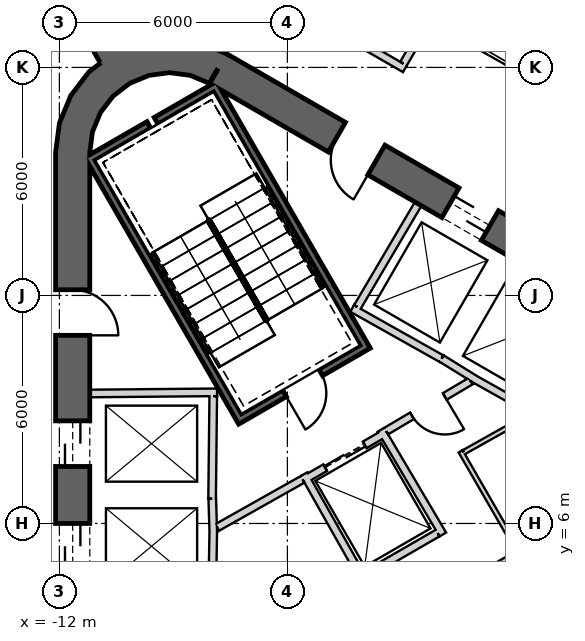
"""IFC4 building model, lengths in metres.
Left out: names, types, materials, properties, quantities, classifications, styles, units other than length and angle.
Written with IfcOpenShell. Run it as: python <this file> out.ifc"""

import sys

from ifc_helpers import new_model, si_unit, direction, frame, frame_2d, origin, place, context, subcontext, project, spatial, polyline, rectangle, outline, extrude, element, fill, save


model = new_model("IFC4")
c1 = context("Model", 3, precision=1e-05, world=origin(), true_north=direction((0.0, 1.0)))
c2 = subcontext(c1, "Body", "Model", "MODEL_VIEW")
j1 = project(units=[si_unit("LENGTHUNIT", "METRE"), si_unit("PLANEANGLEUNIT", "RADIAN")], contexts=[c1])
p1 = place(None, origin())
s1 = spatial("IfcSite", under=j1, at=p1, CompositionType="ELEMENT")
p2 = place(p1, origin())
s2 = spatial("IfcBuilding", under=s1, at=p2, CompositionType="ELEMENT")
p3 = place(p2, frame((0.0, 0.0, 21.5)))
s3 = spatial("IfcBuildingStorey", under=s2, at=p3, CompositionType="ELEMENT", Elevation=21.5)
p4 = place(p3, frame((19.475, 2.208, 0.0), z_axis=(0.0, 0.0, 1.0), x_axis=(-0.866028369851, 0.499994862586, 0.0)))
e1 = element("IfcWall", 1, at=p4, inside=s3, PredefinedType="SHEAR", context=c2, shape_type="SweptSolid", body=[
    extrude(rectangle(XDim=31.523, YDim=0.9, at=frame_2d((15.762, 0.0))), origin(), (0.0, 0.0, 1.0), 6.0),
])
p5 = place(p4, frame((7.062, 0.0, 0.0)))
e2 = element("IfcOpeningElement", 2, at=p5, cuts=e1, PredefinedType="OPENING", context=c2, shape_type="SweptSolid", body=[
    extrude(rectangle(XDim=1.2, YDim=2.4, at=frame_2d((0.6, 1.2))), frame((0.0, 0.46, 0.0), z_axis=(0.0, -1.0, 0.0), x_axis=(1.0, 0.0, 0.0)), (0.0, 0.0, 1.0), 0.92),
])
p6 = place(p4, frame((9.762, 0.0, 0.0)))
e3 = element("IfcOpeningElement", 3, at=p6, cuts=e1, PredefinedType="OPENING", context=c2, shape_type="SweptSolid", body=[
    extrude(rectangle(XDim=1.2, YDim=2.4, at=frame_2d((0.6, 1.2))), frame((0.0, 0.46, 0.0), z_axis=(0.0, -1.0, 0.0), x_axis=(1.0, 0.0, 0.0)), (0.0, 0.0, 1.0), 0.92),
])
p7 = place(p4, frame((12.462, 0.0, 0.0)))
e4 = element("IfcOpeningElement", 4, at=p7, cuts=e1, PredefinedType="OPENING", context=c2, shape_type="SweptSolid", body=[
    extrude(rectangle(XDim=1.2, YDim=2.4, at=frame_2d((0.6, 1.2))), frame((0.0, 0.46, 0.0), z_axis=(0.0, -1.0, 0.0), x_axis=(1.0, 0.0, 0.0)), (0.0, 0.0, 1.0), 0.92),
])
p8 = place(p4, frame((15.162, 0.0, 0.0)))
e5 = element("IfcOpeningElement", 5, at=p8, cuts=e1, PredefinedType="OPENING", context=c2, shape_type="SweptSolid", body=[
    extrude(rectangle(XDim=1.2, YDim=2.4, at=frame_2d((0.6, 1.2))), frame((0.0, 0.46, 0.0), z_axis=(0.0, -1.0, 0.0), x_axis=(1.0, 0.0, 0.0)), (0.0, 0.0, 1.0), 0.92),
])
p9 = place(p4, frame((17.862, 0.0, 0.0)))
e6 = element("IfcOpeningElement", 6, at=p9, cuts=e1, PredefinedType="OPENING", context=c2, shape_type="SweptSolid", body=[
    extrude(rectangle(XDim=1.2, YDim=2.4, at=frame_2d((0.6, 1.2))), frame((0.0, 0.46, 0.0), z_axis=(0.0, -1.0, 0.0), x_axis=(1.0, 0.0, 0.0)), (0.0, 0.0, 1.0), 0.92),
])
p10 = place(p4, frame((20.562, 0.0, 0.0)))
e7 = element("IfcOpeningElement", 7, at=p10, cuts=e1, PredefinedType="OPENING", context=c2, shape_type="SweptSolid", body=[
    extrude(rectangle(XDim=1.2, YDim=2.4, at=frame_2d((0.6, 1.2))), frame((0.0, 0.46, 0.0), z_axis=(0.0, -1.0, 0.0), x_axis=(1.0, 0.0, 0.0)), (0.0, 0.0, 1.0), 0.92),
])
p11 = place(p4, frame((23.262, 0.0, 0.0)))
e8 = element("IfcOpeningElement", 8, at=p11, cuts=e1, PredefinedType="OPENING", context=c2, shape_type="SweptSolid", body=[
    extrude(rectangle(XDim=1.2, YDim=2.4, at=frame_2d((0.6, 1.2))), frame((0.0, 0.46, 0.0), z_axis=(0.0, -1.0, 0.0), x_axis=(1.0, 0.0, 0.0)), (0.0, 0.0, 1.0), 0.92),
])
p12 = place(p4, frame((3.612, 0.0, 0.0)))
e9 = element("IfcOpeningElement", 9, at=p12, cuts=e1, PredefinedType="OPENING", context=c2, shape_type="SweptSolid", body=[
    extrude(rectangle(XDim=1.2, YDim=2.4, at=frame_2d((0.6, 1.2))), frame((0.0, 0.46, 0.0), z_axis=(0.0, -1.0, 0.0), x_axis=(1.0, 0.0, 0.0)), (0.0, 0.0, 1.0), 0.92),
])
p13 = place(p4, frame((26.712, 0.0, 0.0)))
e10 = element("IfcOpeningElement", 10, at=p13, cuts=e1, PredefinedType="OPENING", context=c2, shape_type="SweptSolid", body=[
    extrude(rectangle(XDim=1.2, YDim=2.4, at=frame_2d((0.6, 1.2))), frame((0.0, 0.46, 0.0), z_axis=(0.0, -1.0, 0.0), x_axis=(1.0, 0.0, 0.0)), (0.0, 0.0, 1.0), 0.92),
])
p14 = place(p3, frame((-11.65, 15.762, 0.0), z_axis=(0.0, 0.0, 1.0), x_axis=(0.0, -1.0, 0.0)))
e11 = element("IfcWall", 11, at=p14, inside=s3, PredefinedType="SHEAR", context=c2, shape_type="SweptSolid", body=[
    extrude(rectangle(XDim=31.523, YDim=0.9, at=frame_2d((15.762, 0.0))), origin(), (0.0, 0.0, 1.0), 6.0),
])
p15 = place(p14, frame((7.062, 0.0, 0.0)))
e12 = element("IfcOpeningElement", 12, at=p15, cuts=e11, PredefinedType="OPENING", context=c2, shape_type="SweptSolid", body=[
    extrude(rectangle(XDim=1.2, YDim=2.4, at=frame_2d((0.6, 1.2))), frame((0.0, 0.46, 0.0), z_axis=(0.0, -1.0, 0.0), x_axis=(1.0, 0.0, 0.0)), (0.0, 0.0, 1.0), 0.92),
])
p16 = place(p14, frame((9.762, 0.0, 0.0)))
e13 = element("IfcOpeningElement", 13, at=p16, cuts=e11, PredefinedType="OPENING", context=c2, shape_type="SweptSolid", body=[
    extrude(rectangle(XDim=1.2, YDim=2.4, at=frame_2d((0.6, 1.2))), frame((0.0, 0.46, 0.0), z_axis=(0.0, -1.0, 0.0), x_axis=(1.0, 0.0, 0.0)), (0.0, 0.0, 1.0), 0.92),
])
p17 = place(p14, frame((12.462, 0.0, 0.0)))
e14 = element("IfcOpeningElement", 14, at=p17, cuts=e11, PredefinedType="OPENING", context=c2, shape_type="SweptSolid", body=[
    extrude(rectangle(XDim=1.2, YDim=2.4, at=frame_2d((0.6, 1.2))), frame((0.0, 0.46, 0.0), z_axis=(0.0, -1.0, 0.0), x_axis=(1.0, 0.0, 0.0)), (0.0, 0.0, 1.0), 0.92),
])
p18 = place(p14, frame((15.162, 0.0, 0.0)))
e15 = element("IfcOpeningElement", 15, at=p18, cuts=e11, PredefinedType="OPENING", context=c2, shape_type="SweptSolid", body=[
    extrude(rectangle(XDim=1.2, YDim=2.4, at=frame_2d((0.6, 1.2))), frame((0.0, 0.46, 0.0), z_axis=(0.0, -1.0, 0.0), x_axis=(1.0, 0.0, 0.0)), (0.0, 0.0, 1.0), 0.92),
])
p19 = place(p14, frame((17.862, 0.0, 0.0)))
e16 = element("IfcOpeningElement", 16, at=p19, cuts=e11, PredefinedType="OPENING", context=c2, shape_type="SweptSolid", body=[
    extrude(rectangle(XDim=1.2, YDim=2.4, at=frame_2d((0.6, 1.2))), frame((0.0, 0.46, 0.0), z_axis=(0.0, -1.0, 0.0), x_axis=(1.0, 0.0, 0.0)), (0.0, 0.0, 1.0), 0.92),
])
p20 = place(p14, frame((20.562, 0.0, 0.0)))
e17 = element("IfcOpeningElement", 17, at=p20, cuts=e11, PredefinedType="OPENING", context=c2, shape_type="SweptSolid", body=[
    extrude(rectangle(XDim=1.2, YDim=2.4, at=frame_2d((0.6, 1.2))), frame((0.0, 0.46, 0.0), z_axis=(0.0, -1.0, 0.0), x_axis=(1.0, 0.0, 0.0)), (0.0, 0.0, 1.0), 0.92),
])
p21 = place(p14, frame((23.262, 0.0, 0.0)))
e18 = element("IfcOpeningElement", 18, at=p21, cuts=e11, PredefinedType="OPENING", context=c2, shape_type="SweptSolid", body=[
    extrude(rectangle(XDim=1.2, YDim=2.4, at=frame_2d((0.6, 1.2))), frame((0.0, 0.46, 0.0), z_axis=(0.0, -1.0, 0.0), x_axis=(1.0, 0.0, 0.0)), (0.0, 0.0, 1.0), 0.92),
])
p22 = place(p14, frame((3.612, 0.0, 0.0)))
e19 = element("IfcOpeningElement", 19, at=p22, cuts=e11, PredefinedType="OPENING", context=c2, shape_type="SweptSolid", body=[
    extrude(rectangle(XDim=1.2, YDim=2.4, at=frame_2d((0.6, 1.2))), frame((0.0, 0.46, 0.0), z_axis=(0.0, -1.0, 0.0), x_axis=(1.0, 0.0, 0.0)), (0.0, 0.0, 1.0), 0.92),
])
p23 = place(p14, frame((26.712, 0.0, 0.0)))
e20 = element("IfcOpeningElement", 20, at=p23, cuts=e11, PredefinedType="OPENING", context=c2, shape_type="SweptSolid", body=[
    extrude(rectangle(XDim=1.2, YDim=2.4, at=frame_2d((0.6, 1.2))), frame((0.0, 0.46, 0.0), z_axis=(0.0, -1.0, 0.0), x_axis=(1.0, 0.0, 0.0)), (0.0, 0.0, 1.0), 0.92),
])
p24 = place(p3, origin())
e21 = element("IfcWall", 21, at=p24, inside=s3, PredefinedType="SHEAR", context=c2, shape_type="SweptSolid", body=[
    extrude(outline(polyline([(-7.6, 18.36), (-8.323, 18.659), (-9.1, 18.762), (-9.876, 18.659), (-10.6, 18.36), (-11.221, 17.883), (-11.698, 17.262), (-11.998, 16.538), (-12.1, 15.762), (-11.2, 15.762), (-11.128, 16.305), (-10.919, 16.812), (-10.585, 17.247), (-10.15, 17.58), (-9.644, 17.79), (-9.1, 17.862), (-8.556, 17.79), (-8.05, 17.58), (-7.6, 18.36)])), origin(), (0.0, 0.0, 1.0), 6.0),
])
p25 = place(p3, frame((-10.575, 18.316, 0.0), z_axis=(0.0, 0.0, 1.0), x_axis=(-0.499996575515, 0.866027380903, 0.0)))
e22 = element("IfcWall", 22, at=p25, inside=s3, PredefinedType="SHEAR", context=c2, shape_type="SweptSolid", body=[
    extrude(rectangle(XDim=13.954, YDim=0.8, at=frame_2d((6.977, 0.0))), origin(), (0.0, 0.0, 1.0), 6.0),
])
p26 = place(p25, frame((2.05, 0.0, 0.0)))
e23 = element("IfcOpeningElement", 23, at=p26, cuts=e22, PredefinedType="OPENING", context=c2, shape_type="SweptSolid", body=[
    extrude(rectangle(XDim=1.4, YDim=2.4, at=frame_2d((0.7, 1.2))), frame((0.0, 0.41, 0.0), z_axis=(0.0, -1.0, 0.0), x_axis=(1.0, 0.0, 0.0)), (0.0, 0.0, 1.0), 0.82),
])
p27 = place(p3, frame((-11.2, 9.42, 0.0), z_axis=(0.0, 0.0, 1.0), x_axis=(0.999957167047, 0.009255488683, 0.0)))
e24 = element("IfcWall", 24, at=p27, inside=s3, PredefinedType="PLUMBINGWALL", context=c2, shape_type="SweptSolid", body=[
    extrude(rectangle(XDim=3.35, YDim=0.2, at=frame_2d((1.675, 0.0))), origin(), (0.0, 0.0, 1.0), 5.7),
])
p28 = place(p3, frame((-7.951, 9.35, 0.0), z_axis=(0.0, 0.0, 1.0), x_axis=(-0.011120469654, -0.999938165666, 0.0)))
e25 = element("IfcWall", 25, at=p28, inside=s3, PredefinedType="PLUMBINGWALL", context=c2, shape_type="SweptSolid", body=[
    extrude(rectangle(XDim=2.7, YDim=0.2, at=frame_2d((1.35, 0.0))), origin(), (0.0, 0.0, 1.0), 5.7),
])
p29 = place(p3, frame((-7.977, 6.65, 0.0), z_axis=(0.0, 0.0, 1.0), x_axis=(0.030861509705, -0.999523670164, 0.0)))
e26 = element("IfcWall", 26, at=p29, inside=s3, PredefinedType="PLUMBINGWALL", context=c2, shape_type="SweptSolid", body=[
    extrude(rectangle(XDim=0.878, YDim=0.2, at=frame_2d((0.439, 0.0))), origin(), (0.0, 0.0, 1.0), 5.7),
])
p30 = place(p3, frame((-7.949, 5.894, 0.0), z_axis=(0.0, 0.0, 1.0), x_axis=(-0.016809909365, -0.999858703491, 0.0)))
e27 = element("IfcWall", 27, at=p30, inside=s3, PredefinedType="PLUMBINGWALL", context=c2, shape_type="SweptSolid", body=[
    extrude(rectangle(XDim=1.844, YDim=0.2, at=frame_2d((0.922, 0.0))), origin(), (0.0, 0.0, 1.0), 5.7),
])
p31 = place(p3, frame((-1.941, 10.339, 0.0), z_axis=(0.0, 0.0, 1.0), x_axis=(0.850216889117, -0.526432561171, 0.0)))
e28 = element("IfcWall", 28, at=p31, inside=s3, PredefinedType="PLUMBINGWALL", context=c2, shape_type="SweptSolid", body=[
    extrude(rectangle(XDim=1.078, YDim=0.2, at=frame_2d((0.539, 0.0))), origin(), (0.0, 0.0, 1.0), 5.7),
])
p32 = place(p3, frame((0.478, 8.928, 0.0), z_axis=(0.0, 0.0, 1.0), x_axis=(-0.871988740738, 0.489525929882, 0.0)))
e29 = element("IfcWall", 29, at=p32, inside=s3, PredefinedType="PLUMBINGWALL", context=c2, shape_type="SweptSolid", body=[
    extrude(rectangle(XDim=1.845, YDim=0.2, at=frame_2d((0.922, 0.0))), origin(), (0.0, 0.0, 1.0), 5.7),
])
p33 = place(p3, frame((-4.296, 11.659, 0.0), z_axis=(0.0, 0.0, 1.0), x_axis=(0.871534483978, -0.490334215854, 0.0)))
e30 = element("IfcWall", 30, at=p33, inside=s3, PredefinedType="PLUMBINGWALL", context=c2, shape_type="SweptSolid", body=[
    extrude(rectangle(XDim=2.7, YDim=0.2, at=frame_2d((1.35, 0.0))), origin(), (0.0, 0.0, 1.0), 5.7),
])
p34 = place(p3, frame((-4.158, 11.696, 0.0), z_axis=(0.0, 0.0, 1.0), x_axis=(0.508018930956, 0.861345903683, 0.0)))
e31 = element("IfcWall", 31, at=p34, inside=s3, PredefinedType="PLUMBINGWALL", context=c2, shape_type="SweptSolid", body=[
    extrude(rectangle(XDim=3.15, YDim=0.2, at=frame_2d((1.575, 0.0))), origin(), (0.0, 0.0, 1.0), 5.7),
])
p35 = place(p3, frame((-11.245, 15.678, -0.3), z_axis=(0.0, 0.0, 1.0), x_axis=(0.499977274689, -0.866038523851, 0.0)))
e32 = element("IfcWall", 32, at=p35, inside=s3, PredefinedType="SHEAR", context=c2, shape_type="SweptSolid", body=[
    extrude(rectangle(XDim=8.1, YDim=0.2, at=frame_2d((4.05, 0.0))), origin(), (0.0, 0.0, 1.0), 6.0),
])
p36 = place(p3, frame((-7.818, 17.541, -0.3), z_axis=(0.0, 0.0, 1.0), x_axis=(-0.866088799389, -0.499890179513, 0.0)))
e33 = element("IfcWall", 33, at=p36, inside=s3, PredefinedType="SHEAR", context=c2, shape_type="SweptSolid", body=[
    extrude(rectangle(XDim=1.89, YDim=0.2, at=frame_2d((0.945, 0.0))), origin(), (0.0, 0.0, 1.0), 6.0),
])
p37 = place(p3, frame((-9.645, 16.486, -0.3), z_axis=(0.0, 0.0, 1.0), x_axis=(-0.866038843867, -0.499976720371, 0.0)))
e34 = element("IfcWall", 34, at=p37, inside=s3, PredefinedType="SHEAR", context=c2, shape_type="SweptSolid", body=[
    extrude(rectangle(XDim=1.69, YDim=0.2, at=frame_2d((0.845, 0.0))), origin(), (0.0, 0.0, 1.0), 6.0),
])
p38 = place(p3, frame((-7.854, 17.405, -0.3), z_axis=(0.0, 0.0, 1.0), x_axis=(0.499997992926, -0.866026562566, 0.0)))
e35 = element("IfcWall", 35, at=p38, inside=s3, PredefinedType="SHEAR", context=c2, shape_type="SweptSolid", body=[
    extrude(rectangle(XDim=7.9, YDim=0.2, at=frame_2d((3.95, 0.0))), origin(), (0.0, 0.0, 1.0), 6.0),
])
p39 = place(p3, frame((-7.159, 8.8, -0.3), z_axis=(0.0, 0.0, 1.0), x_axis=(0.866047807691, 0.499961193289, 0.0)))
e36 = element("IfcWall", 36, at=p39, inside=s3, PredefinedType="SHEAR", context=c2, shape_type="SweptSolid", body=[
    extrude(rectangle(XDim=3.6, YDim=0.2, at=frame_2d((1.8, 0.0))), origin(), (0.0, 0.0, 1.0), 6.0),
])
p40 = place(p39, frame((1.25, 0.0, 0.3)))
e37 = element("IfcOpeningElement", 37, at=p40, cuts=e36, PredefinedType="OPENING", context=c2, shape_type="SweptSolid", body=[
    extrude(rectangle(XDim=1.1, YDim=2.1, at=frame_2d((0.55, 1.05))), frame((0.0, 0.11, 0.0), z_axis=(0.0, -1.0, 0.0), x_axis=(1.0, 0.0, 0.0)), (0.0, 0.0, 1.0), 0.22),
])
p41 = place(p3, frame((-5.524, 7.168, 0.0), z_axis=(0.0, 0.0, 1.0), x_axis=(0.866024647952, 0.500001309137, 0.0)))
e38 = element("IfcWall", 38, at=p41, inside=s3, PredefinedType="PLUMBINGWALL", context=c2, shape_type="SweptSolid", body=[
    extrude(rectangle(XDim=2.4, YDim=0.2, at=frame_2d((1.2, 0.0))), origin(), (0.0, 0.0, 1.0), 5.7),
])
p42 = place(p41, frame((0.6, 0.0, 0.0)))
e39 = element("IfcOpeningElement", 39, at=p42, cuts=e38, PredefinedType="OPENING", context=c2, shape_type="SweptSolid", body=[
    extrude(rectangle(XDim=1.2, YDim=2.4, at=frame_2d((0.6, 1.2))), frame((0.0, 0.11, 0.0), z_axis=(0.0, -1.0, 0.0), x_axis=(1.0, 0.0, 0.0)), (0.0, 0.0, 1.0), 0.22),
])
p43 = place(p3, frame((-4.039, 4.596, 0.0), z_axis=(0.0, 0.0, 1.0), x_axis=(-0.491322718731, 0.870977603649, 0.0)))
e40 = element("IfcWall", 40, at=p43, inside=s3, PredefinedType="PLUMBINGWALL", context=c2, shape_type="SweptSolid", body=[
    extrude(rectangle(XDim=3.1, YDim=0.2, at=frame_2d((1.55, 0.0))), origin(), (0.0, 0.0, 1.0), 5.7),
])
p44 = place(p3, frame((-3.538, 8.465, 0.0), z_axis=(0.0, 0.0, 1.0), x_axis=(0.508616218331, -0.860993346345, 0.0)))
e41 = element("IfcWall", 41, at=p44, inside=s3, PredefinedType="PLUMBINGWALL", context=c2, shape_type="SweptSolid", body=[
    extrude(rectangle(XDim=3.2, YDim=0.2, at=frame_2d((1.6, 0.0))), origin(), (0.0, 0.0, 1.0), 5.7),
])
p45 = place(p3, frame((-2.047, 5.746, 0.0), z_axis=(0.0, 0.0, 1.0), x_axis=(-0.866019606374, -0.500010041276, 0.0)))
e42 = element("IfcWall", 42, at=p45, inside=s3, PredefinedType="PLUMBINGWALL", context=c2, shape_type="SweptSolid", body=[
    extrude(rectangle(XDim=2.205, YDim=0.2, at=frame_2d((1.102, 0.0))), origin(), (0.0, 0.0, 1.0), 5.7),
])
p46 = place(p3, frame((-5.6, 7.16, 0.0), z_axis=(0.0, 0.0, 1.0), x_axis=(-0.871340486379, -0.490678873396, 0.0)))
e43 = element("IfcWall", 43, at=p46, inside=s3, PredefinedType="PARTITIONING", context=c2, shape_type="SweptSolid", body=[
    extrude(rectangle(XDim=2.581, YDim=0.2, at=frame_2d((1.291, 0.0))), origin(), (0.0, 0.0, 1.0), 5.7),
])
p47 = place(p3, frame((-1.179, 9.745, 0.0), z_axis=(0.0, 0.0, 1.0), x_axis=(-0.860598681535, -0.509283721849, 0.0)))
e44 = element("IfcWall", 44, at=p47, inside=s3, PredefinedType="PARTITIONING", context=c2, shape_type="SweptSolid", body=[
    extrude(rectangle(XDim=2.581, YDim=0.2, at=frame_2d((1.291, 0.0))), origin(), (0.0, 0.0, 1.0), 5.7),
])
p48 = place(p47, frame((0.791, 0.0, 0.0)))
e45 = element("IfcOpeningElement", 45, at=p48, cuts=e44, PredefinedType="OPENING", context=c2, shape_type="SweptSolid", body=[
    extrude(rectangle(XDim=1.0, YDim=2.1, at=frame_2d((0.5, 1.05))), frame((0.0, 0.11, 0.0), z_axis=(0.0, -1.0, 0.0), x_axis=(1.0, 0.0, 0.0)), (0.0, 0.0, 1.0), 0.22),
])
p49 = place(p3, frame((0.14, 5.277, 0.0), z_axis=(0.0, 0.0, 1.0), x_axis=(-0.865989465428, -0.500062241894, 0.0)))
e46 = element("IfcWall", 46, at=p49, inside=s3, PredefinedType="PARTITIONING", context=c2, shape_type="SweptSolid", body=[
    extrude(rectangle(XDim=1.7, YDim=0.12, at=frame_2d((0.85, 0.0))), origin(), (0.0, 0.0, 1.0), 5.7),
])
p50 = place(p3, frame((-1.442, 7.897, 0.0), z_axis=(0.0, 0.0, 1.0), x_axis=(0.499990139034, -0.866031096941, 0.0)))
e47 = element("IfcWall", 47, at=p50, inside=s3, PredefinedType="PARTITIONING", context=c2, shape_type="SweptSolid", body=[
    extrude(rectangle(XDim=3.0, YDim=0.12, at=frame_2d((1.5, 0.0))), origin(), (0.0, 0.0, 1.0), 5.7),
])
p51 = place(p3, frame((0.475, 8.905, 0.0), z_axis=(0.0, 0.0, 1.0), x_axis=(-0.871832572129, -0.489804007921, 0.0)))
e48 = element("IfcWall", 48, at=p51, inside=s3, PredefinedType="PARTITIONING", context=c2, shape_type="SweptSolid", body=[
    extrude(rectangle(XDim=2.104, YDim=0.12, at=frame_2d((1.052, 0.0))), origin(), (0.0, 0.0, 1.0), 5.7),
])
p52 = place(p3, frame((-2.909, 17.962, 0.0), z_axis=(0.0, 0.0, 1.0), x_axis=(-0.866156637233, 0.499772628079, 0.0)))
e49 = element("IfcWall", 49, at=p52, inside=s3, PredefinedType="PARTITIONING", context=c2, shape_type="SweptSolid", body=[
    extrude(rectangle(XDim=3.931, YDim=0.2, at=frame_2d((1.966, 0.0))), origin(), (0.0, 0.0, 1.0), 4.88),
])
p53 = place(p3, frame((-2.945, 18.098, 0.0), z_axis=(0.0, 0.0, 1.0), x_axis=(0.503235430028, 0.864149351654, 0.0)))
e50 = element("IfcWall", 50, at=p53, inside=s3, PredefinedType="PARTITIONING", context=c2, shape_type="SweptSolid", body=[
    extrude(rectangle(XDim=8.002, YDim=0.2, at=frame_2d((4.001, 0.0))), origin(), (0.0, 0.0, 1.0), 5.17),
])
p54 = place(p53, frame((3.402, 0.0, 0.0)))
e51 = element("IfcOpeningElement", 51, at=p54, cuts=e50, PredefinedType="OPENING", context=c2, shape_type="SweptSolid", body=[
    extrude(rectangle(XDim=1.0, YDim=2.1, at=frame_2d((0.5, 1.05))), frame((0.0, 0.11, 0.0), z_axis=(0.0, -1.0, 0.0), x_axis=(1.0, 0.0, 0.0)), (0.0, 0.0, 1.0), 0.22),
])
p55 = place(p40, origin())
e52 = element("IfcDoor", 52, at=p55, inside=s3, OperationType="SINGLE_SWING_LEFT", PredefinedType="USERDEFINED", context=c2, shape_type="SweptSolid", body=[
    extrude(rectangle(XDim=1.1, YDim=2.1, at=frame_2d((0.55, 1.05))), frame((0.0, 0.025, 0.0), z_axis=(0.0, -1.0, 0.0), x_axis=(1.0, 0.0, 0.0)), (0.0, 0.0, 1.0), 0.05),
])
fill(e37, e52)
p56 = place(p48, origin())
e53 = element("IfcDoor", 53, at=p56, inside=s3, OperationType="SINGLE_SWING_LEFT", PredefinedType="USERDEFINED", context=c2, shape_type="SweptSolid", body=[
    extrude(rectangle(XDim=1.0, YDim=2.1, at=frame_2d((0.5, 1.05))), frame((0.0, 0.025, 0.0), z_axis=(0.0, -1.0, 0.0), x_axis=(1.0, 0.0, 0.0)), (0.0, 0.0, 1.0), 0.05),
])
fill(e45, e53)
p57 = place(p42, origin())
e54 = element("IfcDoor", 54, at=p57, inside=s3, OperationType="SLIDING_TO_LEFT", PredefinedType="USERDEFINED", context=c2, shape_type="SweptSolid", body=[
    extrude(rectangle(XDim=1.2, YDim=2.4, at=frame_2d((0.6, 1.2))), frame((0.0, 0.025, 0.0), z_axis=(0.0, -1.0, 0.0), x_axis=(1.0, 0.0, 0.0)), (0.0, 0.0, 1.0), 0.05),
])
fill(e39, e54)
p58 = place(p15, origin())
e55 = element("IfcDoor", 55, at=p58, inside=s3, OperationType="SLIDING_TO_LEFT", PredefinedType="USERDEFINED", context=c2, shape_type="SweptSolid", body=[
    extrude(rectangle(XDim=1.2, YDim=2.4, at=frame_2d((0.6, 1.2))), frame((0.0, 0.025, 0.0), z_axis=(0.0, -1.0, 0.0), x_axis=(1.0, 0.0, 0.0)), (0.0, 0.0, 1.0), 0.05),
])
fill(e12, e55)
p59 = place(p16, origin())
e56 = element("IfcDoor", 56, at=p59, inside=s3, OperationType="SLIDING_TO_LEFT", PredefinedType="USERDEFINED", context=c2, shape_type="SweptSolid", body=[
    extrude(rectangle(XDim=1.2, YDim=2.4, at=frame_2d((0.6, 1.2))), frame((0.0, 0.025, 0.0), z_axis=(0.0, -1.0, 0.0), x_axis=(1.0, 0.0, 0.0)), (0.0, 0.0, 1.0), 0.05),
])
fill(e13, e56)
p60 = place(p11, origin())
e57 = element("IfcDoor", 57, at=p60, inside=s3, OperationType="SLIDING_TO_LEFT", PredefinedType="USERDEFINED", context=c2, shape_type="SweptSolid", body=[
    extrude(rectangle(XDim=1.2, YDim=2.4, at=frame_2d((0.6, 1.2))), frame((0.0, 0.025, 0.0), z_axis=(0.0, -1.0, 0.0), x_axis=(1.0, 0.0, 0.0)), (0.0, 0.0, 1.0), 0.05),
])
fill(e8, e57)
p61 = place(p13, origin())
e58 = element("IfcDoor", 58, at=p61, inside=s3, OperationType="SINGLE_SWING_LEFT", PredefinedType="USERDEFINED", context=c2, shape_type="SweptSolid", body=[
    extrude(rectangle(XDim=1.2, YDim=2.4, at=frame_2d((0.6, 1.2))), frame((0.0, 0.025, 0.0), z_axis=(0.0, -1.0, 0.0), x_axis=(1.0, 0.0, 0.0)), (0.0, 0.0, 1.0), 0.05),
])
fill(e10, e58)
p62 = place(p22, origin())
e59 = element("IfcDoor", 59, at=p62, inside=s3, OperationType="SINGLE_SWING_RIGHT", PredefinedType="USERDEFINED", context=c2, shape_type="SweptSolid", body=[
    extrude(rectangle(XDim=1.2, YDim=2.4, at=frame_2d((0.6, 1.2))), frame((0.0, 0.025, 0.0), z_axis=(0.0, -1.0, 0.0), x_axis=(1.0, 0.0, 0.0)), (0.0, 0.0, 1.0), 0.05),
])
fill(e19, e59)
save(model, sys.argv[1])
